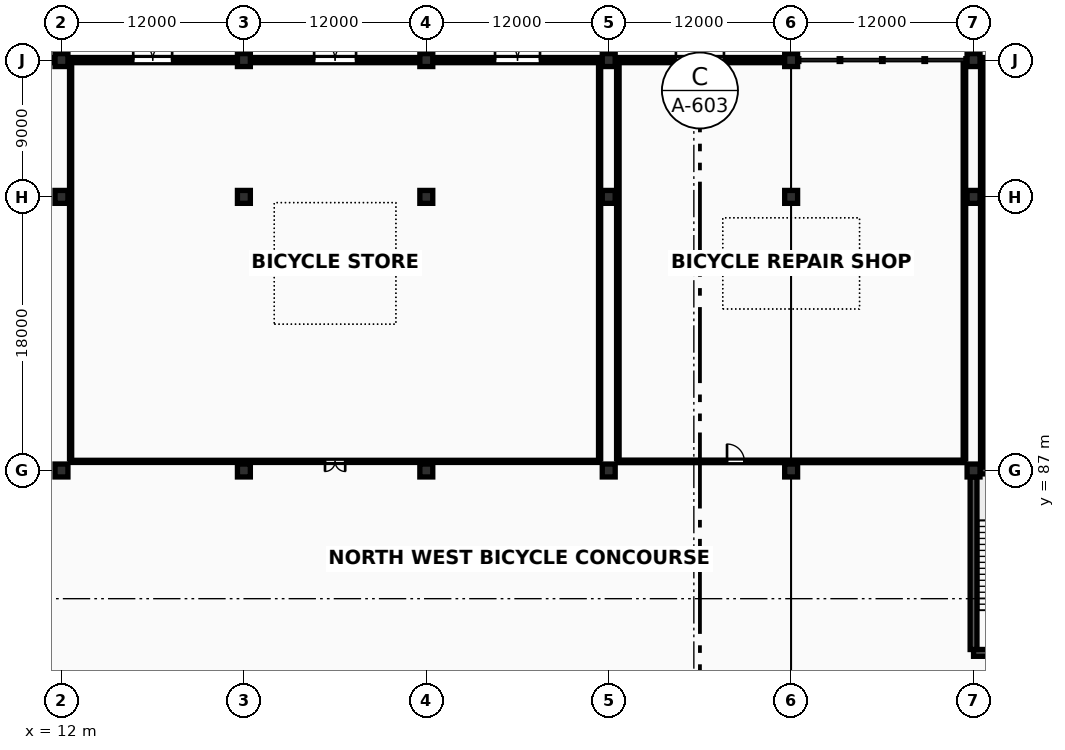
"""IFC4 building model, lengths in metres.
Left out: names, types, materials, properties, quantities, classifications, styles, units other than length and angle.
Written with IfcOpenShell. Run it as: python <this file> out.ifc"""

import sys

from ifc_helpers import new_model, si_unit, direction, frame, frame_2d, origin, origin_2d, place, context, subcontext, project, spatial, rectangle, extrude, element, fill, save


model = new_model("IFC4")
c1 = context("Model", 3, precision=1e-05, world=origin(), true_north=direction((0.0, 1.0)))
c2 = subcontext(c1, "Body", "Model", "MODEL_VIEW")
j1 = project(units=[si_unit("LENGTHUNIT", "METRE"), si_unit("PLANEANGLEUNIT", "RADIAN")], contexts=[c1])
p1 = place(None, origin())
s1 = spatial("IfcSite", under=j1, at=p1, CompositionType="ELEMENT")
p2 = place(p1, origin())
s2 = spatial("IfcBuilding", under=s1, at=p2, CompositionType="ELEMENT")
p3 = place(p2, origin())
s3 = spatial("IfcBuildingStorey", under=s2, at=p3, CompositionType="ELEMENT", Elevation=0.0)
for number, where, z_axis, x_axis in (
    (1, (12.0, 87.0, 0.0), (0.0, 0.0, 1.0), (1.0, 0.0, 0.0)),
    (2, (12.0, 105.0, 0.0), (0.0, 0.0, 1.0), (1.0, 0.0, 0.0)),
    (3, (12.0, 114.0, 0.0), (0.0, 0.0, 1.0), (1.0, 0.0, 0.0)),
    (4, (24.0, 87.0, 0.0), (0.0, 0.0, 1.0), (1.0, 0.0, 0.0)),
    (5, (24.0, 105.0, 0.0), (0.0, 0.0, 1.0), (1.0, 0.0, 0.0)),
    (6, (24.0, 114.0, 0.0), (0.0, 0.0, 1.0), (1.0, 0.0, 0.0)),
    (7, (36.0, 87.0, 0.0), (0.0, 0.0, 1.0), (1.0, 0.0, 0.0)),
    (8, (36.0, 105.0, 0.0), (0.0, 0.0, 1.0), (1.0, 0.0, 0.0)),
    (9, (36.0, 114.0, 0.0), (0.0, 0.0, 1.0), (1.0, 0.0, 0.0)),
    (10, (48.0, 87.0, 0.0), (0.0, 0.0, 1.0), (1.0, 0.0, 0.0)),
    (11, (48.0, 105.0, 0.0), (0.0, 0.0, 1.0), (1.0, 0.0, 0.0)),
    (12, (48.0, 114.0, 0.0), (0.0, 0.0, 1.0), (1.0, 0.0, 0.0)),
    (13, (60.0, 87.0, 0.0), (0.0, 0.0, 1.0), (1.0, 0.0, 0.0)),
    (14, (60.0, 105.0, 0.0), (0.0, 0.0, 1.0), (1.0, 0.0, 0.0)),
    (15, (60.0, 114.0, 0.0), (0.0, 0.0, 1.0), (1.0, 0.0, 0.0)),
    (16, (72.0, 87.0, 0.0), (0.0, 0.0, 1.0), (1.0, 0.0, 0.0)),
    (17, (72.0, 105.0, 0.0), (0.0, 0.0, 1.0), (1.0, 0.0, 0.0)),
    (18, (72.0, 114.0, 0.0), (0.0, 0.0, 1.0), (1.0, 0.0, 0.0)),
):
    element("IfcColumn", number, at=place(p3, frame(where, z_axis=z_axis, x_axis=x_axis)), inside=s3, PredefinedType="COLUMN", context=c2, shape_type="SweptSolid", body=[
        extrude(rectangle(XDim=0.85, YDim=0.85, at=origin_2d()), origin(), (0.0, 0.0, 1.0), 5.4),
    ])
p4 = place(p3, frame((72.0, 75.0, 0.0), z_axis=(0.0, 0.0, 1.0), x_axis=(1.0, 0.0, 0.0)))
e19 = element("IfcWall", 19, at=p4, inside=s3, PredefinedType="SHEAR", context=c2, shape_type="SweptSolid", body=[
    extrude(rectangle(XDim=12.0, YDim=0.45, at=frame_2d((6.0, 0.0))), origin(), (0.0, 0.0, 1.0), 5.203),
])
p5 = place(p4, frame((7.45, 0.0, 0.0)))
e20 = element("IfcOpeningElement", 20, at=p5, cuts=e19, PredefinedType="OPENING", context=c2, shape_type="SweptSolid", body=[
    extrude(rectangle(XDim=1.5, YDim=2.25, at=frame_2d((0.75, 1.125))), frame((0.0, 0.24, 0.0), z_axis=(0.0, -1.0, 0.0), x_axis=(1.0, 0.0, 0.0)), (0.0, 0.0, 1.0), 0.48),
])
p6 = place(p3, frame((72.422, 87.0, 0.0), z_axis=(0.0, 0.0, 1.0), x_axis=(1.0, 0.0, 0.0)))
e21 = element("IfcWall", 21, at=p6, inside=s3, PredefinedType="SHEAR", context=c2, shape_type="SweptSolid", body=[
    extrude(rectangle(XDim=11.156, YDim=0.45, at=frame_2d((5.578, 0.0))), origin(), (0.0, 0.0, 1.0), 5.203),
])
p7 = place(p6, frame((1.178, 0.0, 0.0)))
e22 = element("IfcOpeningElement", 22, at=p7, cuts=e21, PredefinedType="OPENING", context=c2, shape_type="SweptSolid", body=[
    extrude(rectangle(XDim=1.2, YDim=2.2, at=frame_2d((0.6, 1.1))), frame((0.0, 0.24, 0.0), z_axis=(0.0, -1.0, 0.0), x_axis=(1.0, 0.0, 0.0)), (0.0, 0.0, 1.0), 0.48),
])
p8 = place(p3, frame((72.0, 75.222, 0.0), z_axis=(0.0, 0.0, 1.0), x_axis=(0.0, 1.0, 0.0)))
e23 = element("IfcWall", 23, at=p8, inside=s3, PredefinedType="SHEAR", context=c2, shape_type="SweptSolid", body=[
    extrude(rectangle(XDim=11.356, YDim=0.45, at=frame_2d((5.678, 0.0))), origin(), (0.0, 0.0, 1.0), 5.203),
])
p9 = place(p3, frame((0.423, 114.0, 0.0), z_axis=(0.0, 0.0, 1.0), x_axis=(1.0, 0.0, 0.0)))
e24 = element("IfcWall", 24, at=p9, inside=s3, PredefinedType="SOLIDWALL", context=c2, shape_type="SweptSolid", body=[
    extrude(rectangle(XDim=11.154, YDim=0.34, at=frame_2d((5.577, 0.0))), origin(), (0.0, 0.0, 1.0), 3.85),
])
p10 = place(p9, frame((5.002, 0.0, 0.85)))
e25 = element("IfcOpeningElement", 25, at=p10, cuts=e24, PredefinedType="OPENING", context=c2, shape_type="SweptSolid", body=[
    extrude(rectangle(XDim=1.15, YDim=1.25, at=frame_2d((0.575, 0.625))), frame((0.0, 0.185, 0.0), z_axis=(0.0, -1.0, 0.0), x_axis=(1.0, 0.0, 0.0)), (0.0, 0.0, 1.0), 0.37),
])
p11 = place(p3, frame((12.423, 114.0, 0.0), z_axis=(0.0, 0.0, 1.0), x_axis=(1.0, 0.0, 0.0)))
e26 = element("IfcWall", 26, at=p11, inside=s3, PredefinedType="SOLIDWALL", context=c2, shape_type="SweptSolid", body=[
    extrude(rectangle(XDim=11.154, YDim=0.34, at=frame_2d((5.577, 0.0))), origin(), (0.0, 0.0, 1.0), 3.85),
])
p12 = place(p11, frame((4.297, 0.0, 0.0)))
e27 = element("IfcOpeningElement", 27, at=p12, cuts=e26, PredefinedType="OPENING", context=c2, shape_type="SweptSolid", body=[
    extrude(rectangle(XDim=2.56, YDim=2.48, at=frame_2d((1.28, 1.24))), frame((0.0, 0.185, 0.0), z_axis=(0.0, -1.0, 0.0), x_axis=(1.0, 0.0, 0.0)), (0.0, 0.0, 1.0), 0.37),
])
p13 = place(p3, frame((24.423, 114.0, 0.0), z_axis=(0.0, 0.0, 1.0), x_axis=(1.0, 0.0, 0.0)))
e28 = element("IfcWall", 28, at=p13, inside=s3, PredefinedType="SOLIDWALL", context=c2, shape_type="SweptSolid", body=[
    extrude(rectangle(XDim=11.154, YDim=0.34, at=frame_2d((5.577, 0.0))), origin(), (0.0, 0.0, 1.0), 3.85),
])
p14 = place(p13, frame((4.197, 0.0, 0.0)))
e29 = element("IfcOpeningElement", 29, at=p14, cuts=e28, PredefinedType="OPENING", context=c2, shape_type="SweptSolid", body=[
    extrude(rectangle(XDim=2.76, YDim=2.54, at=frame_2d((1.38, 1.27))), frame((0.0, 0.185, 0.0), z_axis=(0.0, -1.0, 0.0), x_axis=(1.0, 0.0, 0.0)), (0.0, 0.0, 1.0), 0.37),
])
p15 = place(p3, frame((36.423, 114.0, 0.0), z_axis=(0.0, 0.0, 1.0), x_axis=(1.0, 0.0, 0.0)))
e30 = element("IfcWall", 30, at=p15, inside=s3, PredefinedType="SOLIDWALL", context=c2, shape_type="SweptSolid", body=[
    extrude(rectangle(XDim=11.154, YDim=0.34, at=frame_2d((5.577, 0.0))), origin(), (0.0, 0.0, 1.0), 3.85),
])
p16 = place(p15, frame((4.097, 0.0, 0.0)))
e31 = element("IfcOpeningElement", 31, at=p16, cuts=e30, PredefinedType="OPENING", context=c2, shape_type="SweptSolid", body=[
    extrude(rectangle(XDim=2.96, YDim=2.6, at=frame_2d((1.48, 1.3))), frame((0.0, 0.185, 0.0), z_axis=(0.0, -1.0, 0.0), x_axis=(1.0, 0.0, 0.0)), (0.0, 0.0, 1.0), 0.37),
])
p17 = place(p3, frame((48.423, 114.0, 0.0), z_axis=(0.0, 0.0, 1.0), x_axis=(1.0, 0.0, 0.0)))
e32 = element("IfcWall", 32, at=p17, inside=s3, PredefinedType="SOLIDWALL", context=c2, shape_type="SweptSolid", body=[
    extrude(rectangle(XDim=11.154, YDim=0.34, at=frame_2d((5.577, 0.0))), origin(), (0.0, 0.0, 1.0), 3.85),
])
p18 = place(p17, frame((3.997, 0.0, 0.0)))
e33 = element("IfcOpeningElement", 33, at=p18, cuts=e32, PredefinedType="OPENING", context=c2, shape_type="SweptSolid", body=[
    extrude(rectangle(XDim=3.16, YDim=2.66, at=frame_2d((1.58, 1.33))), frame((0.0, 0.185, 0.0), z_axis=(0.0, -1.0, 0.0), x_axis=(1.0, 0.0, 0.0)), (0.0, 0.0, 1.0), 0.37),
])
p19 = place(p3, frame((72.423, 114.0, 0.0), z_axis=(0.0, 0.0, 1.0), x_axis=(1.0, 0.0, 0.0)))
e34 = element("IfcWall", 34, at=p19, inside=s3, PredefinedType="SOLIDWALL", context=c2, shape_type="SweptSolid", body=[
    extrude(rectangle(XDim=11.154, YDim=0.34, at=frame_2d((5.577, 0.0))), origin(), (0.0, 0.0, 1.0), 3.85),
])
p20 = place(p19, frame((4.797, 0.0, 0.0)))
e35 = element("IfcOpeningElement", 35, at=p20, cuts=e34, PredefinedType="OPENING", context=c2, shape_type="SweptSolid", body=[
    extrude(rectangle(XDim=1.56, YDim=2.3, at=frame_2d((0.78, 1.15))), frame((0.0, 0.185, 0.0), z_axis=(0.0, -1.0, 0.0), x_axis=(1.0, 0.0, 0.0)), (0.0, 0.0, 1.0), 0.37),
])
p21 = place(p3, frame((72.55, 87.3, 0.0), z_axis=(0.0, 0.0, 1.0), x_axis=(0.0, 1.0, 0.0)))
e36 = element("IfcWall", 36, at=p21, inside=s3, PredefinedType="SOLIDWALL", context=c2, shape_type="SweptSolid", body=[
    extrude(rectangle(XDim=26.3, YDim=0.18, at=frame_2d((13.15, 0.0))), origin(), (0.0, 0.0, 1.0), 2.6),
])
p22 = place(p3, frame((12.6, 87.6, 0.0), z_axis=(0.0, 0.0, 1.0), x_axis=(1.0, 0.0, 0.0)))
e37 = element("IfcWall", 37, at=p22, inside=s3, PredefinedType="PARTITIONING", context=c2, shape_type="SweptSolid", body=[
    extrude(rectangle(XDim=34.8, YDim=0.14, at=frame_2d((17.4, 0.0))), origin(), (0.0, 0.0, 1.0), 2.75),
])
p23 = place(p22, frame((16.735, 0.0, 0.0)))
e38 = element("IfcOpeningElement", 38, at=p23, cuts=e37, PredefinedType="OPENING", context=c2, shape_type="SweptSolid", body=[
    extrude(rectangle(XDim=1.33, YDim=2.2, at=frame_2d((0.665, 1.1))), frame((0.0, 0.085, 0.0), z_axis=(0.0, -1.0, 0.0), x_axis=(1.0, 0.0, 0.0)), (0.0, 0.0, 1.0), 0.17),
])
for number, where, z_axis, x_axis in (
    (39, (12.6, 87.76, 0.0), (0.0, 0.0, 1.0), (0.0, 1.0, 0.0)),
    (40, (47.4, 87.76, 0.0), (0.0, 0.0, 1.0), (0.0, 1.0, 0.0)),
):
    element("IfcWall", number, at=place(p3, frame(where, z_axis=z_axis, x_axis=x_axis)), inside=s3, PredefinedType="PARTITIONING", context=c2, shape_type="SweptSolid", body=[
        extrude(rectangle(XDim=26.1, YDim=0.14, at=frame_2d((13.05, 0.0))), origin(), (0.0, 0.0, 1.0), 2.75),
    ])
p24 = place(p3, frame((48.6, 87.6, 0.0), z_axis=(0.0, 0.0, 1.0), x_axis=(1.0, 0.0, 0.0)))
e41 = element("IfcWall", 41, at=p24, inside=s3, PredefinedType="PARTITIONING", context=c2, shape_type="SweptSolid", body=[
    extrude(rectangle(XDim=22.8, YDim=0.165, at=frame_2d((11.4, 0.0))), origin(), (0.0, 0.0, 1.0), 2.75),
])
p25 = place(p24, frame((7.182, 0.0, 0.0)))
e42 = element("IfcOpeningElement", 42, at=p25, cuts=e41, PredefinedType="OPENING", context=c2, shape_type="SweptSolid", body=[
    extrude(rectangle(XDim=1.14, YDim=2.24, at=frame_2d((0.57, 1.12))), frame((0.0, 0.097, 0.0), z_axis=(0.0, -1.0, 0.0), x_axis=(1.0, 0.0, 0.0)), (0.0, 0.0, 1.0), 0.195),
])
for number, where, z_axis, x_axis in (
    (43, (48.6, 87.76, 0.0), (0.0, 0.0, 1.0), (0.0, 1.0, 0.0)),
    (44, (71.4, 87.76, 0.0), (0.0, 0.0, 1.0), (0.0, 1.0, 0.0)),
):
    element("IfcWall", number, at=place(p3, frame(where, z_axis=z_axis, x_axis=x_axis)), inside=s3, PredefinedType="PARTITIONING", context=c2, shape_type="SweptSolid", body=[
        extrude(rectangle(XDim=26.1, YDim=0.165, at=frame_2d((13.05, 0.0))), origin(), (0.0, 0.0, 1.0), 2.75),
    ])
p26 = place(p12, origin())
e45 = element("IfcDoor", 45, at=p26, inside=s3, OperationType="DOUBLE_DOOR_SINGLE_SWING", PredefinedType="GATE", context=c2, shape_type="SweptSolid", body=[
    extrude(rectangle(XDim=2.56, YDim=2.48, at=frame_2d((1.28, 1.24))), frame((0.0, 0.025, 0.0), z_axis=(0.0, -1.0, 0.0), x_axis=(1.0, 0.0, 0.0)), (0.0, 0.0, 1.0), 0.05),
])
fill(e27, e45)
p27 = place(p14, origin())
e46 = element("IfcDoor", 46, at=p27, inside=s3, OperationType="DOUBLE_DOOR_SINGLE_SWING", PredefinedType="GATE", context=c2, shape_type="SweptSolid", body=[
    extrude(rectangle(XDim=2.76, YDim=2.54, at=frame_2d((1.38, 1.27))), frame((0.0, 0.025, 0.0), z_axis=(0.0, -1.0, 0.0), x_axis=(1.0, 0.0, 0.0)), (0.0, 0.0, 1.0), 0.05),
])
fill(e29, e46)
p28 = place(p16, origin())
e47 = element("IfcDoor", 47, at=p28, inside=s3, OperationType="DOUBLE_DOOR_SINGLE_SWING", PredefinedType="GATE", context=c2, shape_type="SweptSolid", body=[
    extrude(rectangle(XDim=2.96, YDim=2.6, at=frame_2d((1.48, 1.3))), frame((0.0, 0.025, 0.0), z_axis=(0.0, -1.0, 0.0), x_axis=(1.0, 0.0, 0.0)), (0.0, 0.0, 1.0), 0.05),
])
fill(e31, e47)
p29 = place(p18, origin())
e48 = element("IfcDoor", 48, at=p29, inside=s3, OperationType="DOUBLE_DOOR_SINGLE_SWING", PredefinedType="GATE", context=c2, shape_type="SweptSolid", body=[
    extrude(rectangle(XDim=3.16, YDim=2.66, at=frame_2d((1.58, 1.33))), frame((0.0, 0.025, 0.0), z_axis=(0.0, -1.0, 0.0), x_axis=(1.0, 0.0, 0.0)), (0.0, 0.0, 1.0), 0.05),
])
fill(e33, e48)
p30 = place(p23, origin())
e49 = element("IfcDoor", 49, at=p30, inside=s3, OperationType="DOUBLE_DOOR_SINGLE_SWING", PredefinedType="DOOR", context=c2, shape_type="SweptSolid", body=[
    extrude(rectangle(XDim=1.33, YDim=2.2, at=frame_2d((0.665, 1.1))), frame((0.0, 0.025, 0.0), z_axis=(0.0, -1.0, 0.0), x_axis=(1.0, 0.0, 0.0)), (0.0, 0.0, 1.0), 0.05),
])
fill(e38, e49)
p31 = place(p25, origin())
e50 = element("IfcDoor", 50, at=p31, inside=s3, OperationType="SINGLE_SWING_LEFT", PredefinedType="DOOR", context=c2, shape_type="SweptSolid", body=[
    extrude(rectangle(XDim=1.14, YDim=2.24, at=frame_2d((0.57, 1.12))), frame((0.0, 0.025, 0.0), z_axis=(0.0, -1.0, 0.0), x_axis=(1.0, 0.0, 0.0)), (0.0, 0.0, 1.0), 0.05),
])
fill(e42, e50)
save(model, sys.argv[1])
